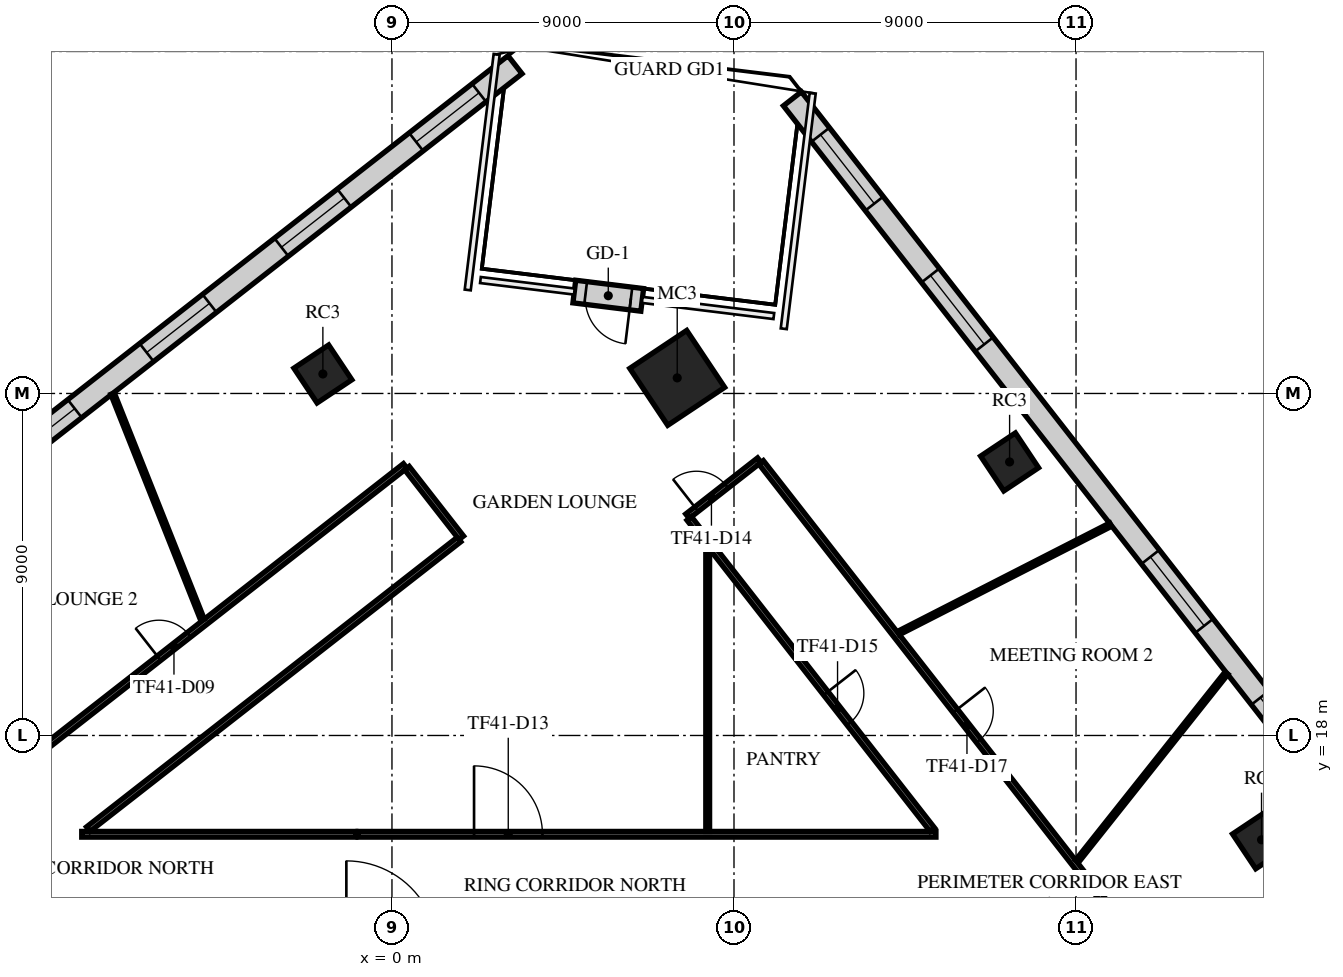
"""IFC4 building model, lengths in metres.
Left out: names, types, materials, properties, quantities, classifications, styles, units other than length and angle.
Written with IfcOpenShell. Run it as: python <this file> out.ifc"""

import sys

from ifc_helpers import new_model, si_unit, direction, frame, frame_2d, origin, origin_2d, place, context, subcontext, project, spatial, rectangle, extrude, element, fill, save


model = new_model("IFC4")
c1 = context("Model", 3, precision=1e-05, world=origin(), true_north=direction((0.0, 1.0)))
c2 = subcontext(c1, "Body", "Model", "MODEL_VIEW")
j1 = project(units=[si_unit("LENGTHUNIT", "METRE"), si_unit("PLANEANGLEUNIT", "RADIAN")], contexts=[c1])
p1 = place(None, origin())
s1 = spatial("IfcSite", under=j1, at=p1, CompositionType="ELEMENT")
p2 = place(p1, origin())
s2 = spatial("IfcBuilding", under=s1, at=p2, CompositionType="ELEMENT")
p3 = place(p2, frame((0.0, 0.0, 175.7)))
s3 = spatial("IfcBuildingStorey", under=s2, at=p3, CompositionType="ELEMENT", Elevation=175.7)
p4 = place(p3, frame((7.506, 27.41, 0.0), z_axis=(0.0, 0.0, 1.0), x_axis=(0.832028680356, 0.55473261583, 0.0)))
e1 = element("IfcColumn", 1, at=p4, inside=s3, PredefinedType="COLUMN", context=c2, shape_type="SweptSolid", body=[
    extrude(rectangle(XDim=1.8, YDim=1.8, at=origin_2d()), origin(), (0.0, 0.0, 1.0), 4.0),
])
for number, where, z_axis, x_axis in (
    (2, (-1.818, 27.513, 0.0), (0.0, 0.0, 1.0), (0.832, 0.555, 0.0)),
    (3, (22.881, 15.255, 0.0), (0.0, 0.0, 1.0), (0.832, 0.555, 0.0)),
    (4, (16.252, 25.198, 0.0), (0.0, 0.0, 1.0), (0.832, 0.555, 0.0)),
):
    element("IfcColumn", number, at=place(p3, frame(where, z_axis=z_axis, x_axis=x_axis)), inside=s3, PredefinedType="COLUMN", context=c2, shape_type="SweptSolid", body=[
        extrude(rectangle(XDim=1.1, YDim=1.1, at=origin_2d()), origin(), (0.0, 0.0, 1.0), 4.0),
    ])
p5 = place(p3, frame((3.238, 35.651, 0.0), z_axis=(0.0, 0.0, 1.0), x_axis=(-0.788009530914, -0.615663040298, 0.0)))
e5 = element("IfcWall", 5, at=p5, inside=s3, PredefinedType="STANDARD", context=c2, shape_type="SweptSolid", body=[
    extrude(rectangle(XDim=49.376, YDim=0.6, at=frame_2d((24.688, 0.0))), origin(), (0.0, 0.0, 1.0), 3.6),
])
p6 = place(p5, frame((1.2, 0.0, 0.9)))
e6 = element("IfcOpeningElement", 6, at=p6, cuts=e5, PredefinedType="OPENING", context=c2, shape_type="SweptSolid", body=[
    extrude(rectangle(XDim=2.1, YDim=2.1, at=frame_2d((1.05, 1.05))), frame((0.0, 0.31, 0.0), z_axis=(0.0, -1.0, 0.0), x_axis=(1.0, 0.0, 0.0)), (0.0, 0.0, 1.0), 0.62),
])
p7 = place(p5, frame((5.7, 0.0, 0.9)))
e7 = element("IfcOpeningElement", 7, at=p7, cuts=e5, PredefinedType="OPENING", context=c2, shape_type="SweptSolid", body=[
    extrude(rectangle(XDim=2.1, YDim=2.1, at=frame_2d((1.05, 1.05))), frame((0.0, 0.31, 0.0), z_axis=(0.0, -1.0, 0.0), x_axis=(1.0, 0.0, 0.0)), (0.0, 0.0, 1.0), 0.62),
])
p8 = place(p5, frame((10.2, 0.0, 0.9)))
e8 = element("IfcOpeningElement", 8, at=p8, cuts=e5, PredefinedType="OPENING", context=c2, shape_type="SweptSolid", body=[
    extrude(rectangle(XDim=2.1, YDim=2.1, at=frame_2d((1.05, 1.05))), frame((0.0, 0.31, 0.0), z_axis=(0.0, -1.0, 0.0), x_axis=(1.0, 0.0, 0.0)), (0.0, 0.0, 1.0), 0.62),
])
p9 = place(p5, frame((14.7, 0.0, 0.9)))
e9 = element("IfcOpeningElement", 9, at=p9, cuts=e5, PredefinedType="OPENING", context=c2, shape_type="SweptSolid", body=[
    extrude(rectangle(XDim=2.1, YDim=2.1, at=frame_2d((1.05, 1.05))), frame((0.0, 0.31, 0.0), z_axis=(0.0, -1.0, 0.0), x_axis=(1.0, 0.0, 0.0)), (0.0, 0.0, 1.0), 0.62),
])
p10 = place(p5, frame((19.2, 0.0, 0.9)))
e10 = element("IfcOpeningElement", 10, at=p10, cuts=e5, PredefinedType="OPENING", context=c2, shape_type="SweptSolid", body=[
    extrude(rectangle(XDim=2.1, YDim=2.1, at=frame_2d((1.05, 1.05))), frame((0.0, 0.31, 0.0), z_axis=(0.0, -1.0, 0.0), x_axis=(1.0, 0.0, 0.0)), (0.0, 0.0, 1.0), 0.62),
])
p11 = place(p5, frame((23.7, 0.0, 0.9)))
e11 = element("IfcOpeningElement", 11, at=p11, cuts=e5, PredefinedType="OPENING", context=c2, shape_type="SweptSolid", body=[
    extrude(rectangle(XDim=2.1, YDim=2.1, at=frame_2d((1.05, 1.05))), frame((0.0, 0.31, 0.0), z_axis=(0.0, -1.0, 0.0), x_axis=(1.0, 0.0, 0.0)), (0.0, 0.0, 1.0), 0.62),
])
p12 = place(p5, frame((28.2, 0.0, 0.9)))
e12 = element("IfcOpeningElement", 12, at=p12, cuts=e5, PredefinedType="OPENING", context=c2, shape_type="SweptSolid", body=[
    extrude(rectangle(XDim=2.1, YDim=2.1, at=frame_2d((1.05, 1.05))), frame((0.0, 0.31, 0.0), z_axis=(0.0, -1.0, 0.0), x_axis=(1.0, 0.0, 0.0)), (0.0, 0.0, 1.0), 0.62),
])
p13 = place(p5, frame((32.7, 0.0, 0.9)))
e13 = element("IfcOpeningElement", 13, at=p13, cuts=e5, PredefinedType="OPENING", context=c2, shape_type="SweptSolid", body=[
    extrude(rectangle(XDim=2.1, YDim=2.1, at=frame_2d((1.05, 1.05))), frame((0.0, 0.31, 0.0), z_axis=(0.0, -1.0, 0.0), x_axis=(1.0, 0.0, 0.0)), (0.0, 0.0, 1.0), 0.62),
])
p14 = place(p5, frame((37.2, 0.0, 0.9)))
e14 = element("IfcOpeningElement", 14, at=p14, cuts=e5, PredefinedType="OPENING", context=c2, shape_type="SweptSolid", body=[
    extrude(rectangle(XDim=2.1, YDim=2.1, at=frame_2d((1.05, 1.05))), frame((0.0, 0.31, 0.0), z_axis=(0.0, -1.0, 0.0), x_axis=(1.0, 0.0, 0.0)), (0.0, 0.0, 1.0), 0.62),
])
p15 = place(p5, frame((41.7, 0.0, 0.9)))
e15 = element("IfcOpeningElement", 15, at=p15, cuts=e5, PredefinedType="OPENING", context=c2, shape_type="SweptSolid", body=[
    extrude(rectangle(XDim=2.1, YDim=2.1, at=frame_2d((1.05, 1.05))), frame((0.0, 0.31, 0.0), z_axis=(0.0, -1.0, 0.0), x_axis=(1.0, 0.0, 0.0)), (0.0, 0.0, 1.0), 0.62),
])
p16 = place(p5, frame((46.138, 0.0, 0.9)))
e16 = element("IfcOpeningElement", 16, at=p16, cuts=e5, PredefinedType="OPENING", context=c2, shape_type="SweptSolid", body=[
    extrude(rectangle(XDim=2.1, YDim=2.1, at=frame_2d((1.05, 1.05))), frame((0.0, 0.31, 0.0), z_axis=(0.0, -1.0, 0.0), x_axis=(1.0, 0.0, 0.0)), (0.0, 0.0, 1.0), 0.62),
])
p17 = place(p3, frame((36.503, 1.52, 0.0), z_axis=(0.0, 0.0, 1.0), x_axis=(-0.615660779349, 0.788011297363, 0.0)))
e17 = element("IfcWall", 17, at=p17, inside=s3, PredefinedType="STANDARD", context=c2, shape_type="SweptSolid", body=[
    extrude(rectangle(XDim=42.176, YDim=0.6, at=frame_2d((21.088, 0.0))), origin(), (0.0, 0.0, 1.0), 3.6),
])
p18 = place(p17, frame((1.138, 0.0, 0.9)))
e18 = element("IfcOpeningElement", 18, at=p18, cuts=e17, PredefinedType="OPENING", context=c2, shape_type="SweptSolid", body=[
    extrude(rectangle(XDim=2.3, YDim=2.1, at=frame_2d((1.15, 1.05))), frame((0.0, 0.31, 0.0), z_axis=(0.0, -1.0, 0.0), x_axis=(1.0, 0.0, 0.0)), (0.0, 0.0, 1.0), 0.62),
])
p19 = place(p17, frame((5.776, 0.0, 0.9)))
e19 = element("IfcOpeningElement", 19, at=p19, cuts=e17, PredefinedType="OPENING", context=c2, shape_type="SweptSolid", body=[
    extrude(rectangle(XDim=2.3, YDim=2.1, at=frame_2d((1.15, 1.05))), frame((0.0, 0.31, 0.0), z_axis=(0.0, -1.0, 0.0), x_axis=(1.0, 0.0, 0.0)), (0.0, 0.0, 1.0), 0.62),
])
p20 = place(p17, frame((10.476, 0.0, 0.9)))
e20 = element("IfcOpeningElement", 20, at=p20, cuts=e17, PredefinedType="OPENING", context=c2, shape_type="SweptSolid", body=[
    extrude(rectangle(XDim=2.3, YDim=2.1, at=frame_2d((1.15, 1.05))), frame((0.0, 0.31, 0.0), z_axis=(0.0, -1.0, 0.0), x_axis=(1.0, 0.0, 0.0)), (0.0, 0.0, 1.0), 0.62),
])
p21 = place(p17, frame((15.176, 0.0, 0.9)))
e21 = element("IfcOpeningElement", 21, at=p21, cuts=e17, PredefinedType="OPENING", context=c2, shape_type="SweptSolid", body=[
    extrude(rectangle(XDim=2.3, YDim=2.1, at=frame_2d((1.15, 1.05))), frame((0.0, 0.31, 0.0), z_axis=(0.0, -1.0, 0.0), x_axis=(1.0, 0.0, 0.0)), (0.0, 0.0, 1.0), 0.62),
])
p22 = place(p17, frame((19.876, 0.0, 0.9)))
e22 = element("IfcOpeningElement", 22, at=p22, cuts=e17, PredefinedType="OPENING", context=c2, shape_type="SweptSolid", body=[
    extrude(rectangle(XDim=2.3, YDim=2.1, at=frame_2d((1.15, 1.05))), frame((0.0, 0.31, 0.0), z_axis=(0.0, -1.0, 0.0), x_axis=(1.0, 0.0, 0.0)), (0.0, 0.0, 1.0), 0.62),
])
p23 = place(p17, frame((24.576, 0.0, 0.9)))
e23 = element("IfcOpeningElement", 23, at=p23, cuts=e17, PredefinedType="OPENING", context=c2, shape_type="SweptSolid", body=[
    extrude(rectangle(XDim=2.3, YDim=2.1, at=frame_2d((1.15, 1.05))), frame((0.0, 0.31, 0.0), z_axis=(0.0, -1.0, 0.0), x_axis=(1.0, 0.0, 0.0)), (0.0, 0.0, 1.0), 0.62),
])
p24 = place(p17, frame((33.976, 0.0, 0.9)))
e24 = element("IfcOpeningElement", 24, at=p24, cuts=e17, PredefinedType="OPENING", context=c2, shape_type="SweptSolid", body=[
    extrude(rectangle(XDim=2.3, YDim=2.1, at=frame_2d((1.15, 1.05))), frame((0.0, 0.31, 0.0), z_axis=(0.0, -1.0, 0.0), x_axis=(1.0, 0.0, 0.0)), (0.0, 0.0, 1.0), 0.62),
])
p25 = place(p17, frame((38.676, 0.0, 0.9)))
e25 = element("IfcOpeningElement", 25, at=p25, cuts=e17, PredefinedType="OPENING", context=c2, shape_type="SweptSolid", body=[
    extrude(rectangle(XDim=2.3, YDim=2.1, at=frame_2d((1.15, 1.05))), frame((0.0, 0.31, 0.0), z_axis=(0.0, -1.0, 0.0), x_axis=(1.0, 0.0, 0.0)), (0.0, 0.0, 1.0), 0.62),
])
p26 = place(p3, frame((6.585, 29.462, 0.0), z_axis=(0.0, 0.0, 1.0), x_axis=(-0.992554965996, 0.121797534772, 0.0)))
e26 = element("IfcWall", 26, at=p26, inside=s3, PredefinedType="STANDARD", context=c2, shape_type="SweptSolid", body=[
    extrude(rectangle(XDim=1.8, YDim=0.6, at=frame_2d((0.9, 0.0))), origin(), (0.0, 0.0, 1.0), 3.6),
])
p27 = place(p26, frame((0.3, 0.0, 0.0)))
e27 = element("IfcOpeningElement", 27, at=p27, cuts=e26, PredefinedType="OPENING", context=c2, shape_type="SweptSolid", body=[
    extrude(rectangle(XDim=1.2, YDim=2.4, at=frame_2d((0.6, 1.2))), frame((0.0, 0.31, 0.0), z_axis=(0.0, -1.0, 0.0), x_axis=(1.0, 0.0, 0.0)), (0.0, 0.0, 1.0), 0.62),
])
p28 = place(p3, frame((-24.433, 5.734, 0.0), z_axis=(0.0, 0.0, 1.0), x_axis=(0.788010131951, 0.615662271008, 0.0)))
e28 = element("IfcWall", 28, at=p28, inside=s3, PredefinedType="PARTITIONING", context=c2, shape_type="SweptSolid", body=[
    extrude(rectangle(XDim=31.448, YDim=0.15, at=frame_2d((15.724, 0.0))), origin(), (0.0, 0.0, 1.0), 3.15),
])
p29 = place(p28, frame((13.108, 0.0, 0.0)))
e29 = element("IfcOpeningElement", 29, at=p29, cuts=e28, PredefinedType="OPENING", context=c2, shape_type="SweptSolid", body=[
    extrude(rectangle(XDim=1.0, YDim=2.1, at=frame_2d((0.5, 1.05))), frame((0.0, 0.085, 0.0), z_axis=(0.0, -1.0, 0.0), x_axis=(1.0, 0.0, 0.0)), (0.0, 0.0, 1.0), 0.17),
])
p30 = place(p28, frame((23.227, 0.0, 0.0)))
e30 = element("IfcOpeningElement", 30, at=p30, cuts=e28, PredefinedType="OPENING", context=c2, shape_type="SweptSolid", body=[
    extrude(rectangle(XDim=1.0, YDim=2.1, at=frame_2d((0.5, 1.05))), frame((0.0, 0.085, 0.0), z_axis=(0.0, -1.0, 0.0), x_axis=(1.0, 0.0, 0.0)), (0.0, 0.0, 1.0), 0.17),
])
p31 = place(p3, frame((-8.163, 15.4, 0.0), z_axis=(0.0, 0.0, 1.0), x_axis=(1.0, 0.0, 0.0)))
e31 = element("IfcWall", 31, at=p31, inside=s3, PredefinedType="PARTITIONING", context=c2, shape_type="SweptSolid", body=[
    extrude(rectangle(XDim=7.211, YDim=0.15, at=frame_2d((3.605, 0.0))), origin(), (0.0, 0.0, 1.0), 3.15),
])
p32 = place(p3, frame((-7.991, 15.534, 0.0), z_axis=(0.0, 0.0, 1.0), x_axis=(0.788030651404, 0.615636006459, 0.0)))
e32 = element("IfcWall", 32, at=p32, inside=s3, PredefinedType="PARTITIONING", context=c2, shape_type="SweptSolid", body=[
    extrude(rectangle(XDim=12.382, YDim=0.15, at=frame_2d((6.191, 0.0))), origin(), (0.0, 0.0, 1.0), 3.15),
])
p33 = place(p3, frame((-0.89, 15.4, 0.0), z_axis=(0.0, 0.0, 1.0), x_axis=(1.0, 0.0, 0.0)))
e33 = element("IfcWall", 33, at=p33, inside=s3, PredefinedType="PARTITIONING", context=c2, shape_type="SweptSolid", body=[
    extrude(rectangle(XDim=15.204, YDim=0.15, at=frame_2d((7.602, 0.0))), origin(), (0.0, 0.0, 1.0), 3.15),
])
p34 = place(p33, frame((3.05, 0.0, 0.0)))
e34 = element("IfcOpeningElement", 34, at=p34, cuts=e33, PredefinedType="OPENING", context=c2, shape_type="SweptSolid", body=[
    extrude(rectangle(XDim=1.8, YDim=2.1, at=frame_2d((0.9, 1.05))), frame((0.0, 0.085, 0.0), z_axis=(0.0, -1.0, 0.0), x_axis=(1.0, 0.0, 0.0)), (0.0, 0.0, 1.0), 0.17),
])
p35 = place(p3, frame((0.394, 25.036, 0.0), z_axis=(0.0, 0.0, 1.0), x_axis=(0.615277221136, -0.788310815067, 0.0)))
e35 = element("IfcWall", 35, at=p35, inside=s3, PredefinedType="PARTITIONING", context=c2, shape_type="SweptSolid", body=[
    extrude(rectangle(XDim=2.325, YDim=0.15, at=frame_2d((1.163, 0.0))), origin(), (0.0, 0.0, 1.0), 3.6),
])
p36 = place(p3, frame((7.776, 23.769, 0.0), z_axis=(0.0, 0.0, 1.0), x_axis=(0.788101492335, 0.615545317406, 0.0)))
e36 = element("IfcWall", 36, at=p36, inside=s3, PredefinedType="PARTITIONING", context=c2, shape_type="SweptSolid", body=[
    extrude(rectangle(XDim=2.4, YDim=0.15, at=frame_2d((1.2, 0.0))), origin(), (0.0, 0.0, 1.0), 3.15),
])
p37 = place(p36, frame((0.3, 0.0, 0.0)))
e37 = element("IfcOpeningElement", 37, at=p37, cuts=e36, PredefinedType="OPENING", context=c2, shape_type="SweptSolid", body=[
    extrude(rectangle(XDim=1.0, YDim=2.1, at=frame_2d((0.5, 1.05))), frame((0.0, 0.085, 0.0), z_axis=(0.0, -1.0, 0.0), x_axis=(1.0, 0.0, 0.0)), (0.0, 0.0, 1.0), 0.17),
])
p38 = place(p3, frame((7.822, 23.71, 0.0), z_axis=(0.0, 0.0, 1.0), x_axis=(0.615616229425, -0.788046101487, 0.0)))
e38 = element("IfcWall", 38, at=p38, inside=s3, PredefinedType="PARTITIONING", context=c2, shape_type="SweptSolid", body=[
    extrude(rectangle(XDim=10.391, YDim=0.15, at=frame_2d((5.196, 0.0))), origin(), (0.0, 0.0, 1.0), 3.15),
])
p39 = place(p38, frame((5.839, 0.0, 0.0)))
e39 = element("IfcOpeningElement", 39, at=p39, cuts=e38, PredefinedType="OPENING", context=c2, shape_type="SweptSolid", body=[
    extrude(rectangle(XDim=1.0, YDim=2.1, at=frame_2d((0.5, 1.05))), frame((0.0, 0.085, 0.0), z_axis=(0.0, -1.0, 0.0), x_axis=(1.0, 0.0, 0.0)), (0.0, 0.0, 1.0), 0.17),
])
p40 = place(p3, frame((9.713, 25.187, 0.0), z_axis=(0.0, 0.0, 1.0), x_axis=(0.615659714696, -0.788012129158, 0.0)))
e40 = element("IfcWall", 40, at=p40, inside=s3, PredefinedType="PARTITIONING", context=c2, shape_type="SweptSolid", body=[
    extrude(rectangle(XDim=27.811, YDim=0.15, at=frame_2d((13.905, 0.0))), origin(), (0.0, 0.0, 1.0), 3.15),
])
p41 = place(p40, frame((8.299, 0.0, 0.0)))
e41 = element("IfcOpeningElement", 41, at=p41, cuts=e40, PredefinedType="OPENING", context=c2, shape_type="SweptSolid", body=[
    extrude(rectangle(XDim=1.0, YDim=2.1, at=frame_2d((0.5, 1.05))), frame((0.0, 0.085, 0.0), z_axis=(0.0, -1.0, 0.0), x_axis=(1.0, 0.0, 0.0)), (0.0, 0.0, 1.0), 0.17),
])
p42 = place(p40, frame((15.951, 0.0, 0.0)))
e42 = element("IfcOpeningElement", 42, at=p42, cuts=e40, PredefinedType="OPENING", context=c2, shape_type="SweptSolid", body=[
    extrude(rectangle(XDim=1.0, YDim=2.1, at=frame_2d((0.5, 1.05))), frame((0.0, 0.085, 0.0), z_axis=(0.0, -1.0, 0.0), x_axis=(1.0, 0.0, 0.0)), (0.0, 0.0, 1.0), 0.17),
])
p43 = place(p3, frame((-7.351, 26.995, 0.0), z_axis=(0.0, 0.0, 1.0), x_axis=(0.369457986925, -0.929247435239, 0.0)))
e43 = element("IfcWall", 43, at=p43, inside=s3, PredefinedType="PARTITIONING", context=c2, shape_type="SweptSolid", body=[
    extrude(rectangle(XDim=6.406, YDim=0.1, at=frame_2d((3.203, 0.0))), origin(), (0.0, 0.0, 1.0), 2.9),
])
p44 = place(p3, frame((8.308, 15.475, 0.0), z_axis=(0.0, 0.0, 1.0), x_axis=(0.0, 1.0, 0.0)))
e44 = element("IfcWall", 44, at=p44, inside=s3, PredefinedType="PARTITIONING", context=c2, shape_type="SweptSolid", body=[
    extrude(rectangle(XDim=7.427, YDim=0.1, at=frame_2d((3.713, 0.0))), origin(), (0.0, 0.0, 1.0), 3.6),
])
p45 = place(p3, frame((13.33, 20.696, 0.0), z_axis=(0.0, 0.0, 1.0), x_axis=(0.890489061699, 0.455004649421, 0.0)))
e45 = element("IfcWall", 45, at=p45, inside=s3, PredefinedType="PARTITIONING", context=c2, shape_type="SweptSolid", body=[
    extrude(rectangle(XDim=6.266, YDim=0.1, at=frame_2d((3.133, 0.0))), origin(), (0.0, 0.0, 1.0), 2.9),
])
p46 = place(p3, frame((18.025, 14.689, 0.0), z_axis=(0.0, 0.0, 1.0), x_axis=(0.622051275171, 0.782976507348, 0.0)))
e46 = element("IfcWall", 46, at=p46, inside=s3, PredefinedType="PARTITIONING", context=c2, shape_type="SweptSolid", body=[
    extrude(rectangle(XDim=6.326, YDim=0.1, at=frame_2d((3.163, 0.0))), origin(), (0.0, 0.0, 1.0), 2.9),
])
p47 = place(p6, origin())
e47 = element("IfcWindow", 47, at=p47, inside=s3, PartitioningType="SINGLE_PANEL", PredefinedType="WINDOW", context=c2, shape_type="SweptSolid", body=[
    extrude(rectangle(XDim=2.1, YDim=2.1, at=frame_2d((1.05, 1.05))), frame((0.0, 0.03, 0.0), z_axis=(0.0, -1.0, 0.0), x_axis=(1.0, 0.0, 0.0)), (0.0, 0.0, 1.0), 0.06),
])
fill(e6, e47)
p48 = place(p7, origin())
e48 = element("IfcWindow", 48, at=p48, inside=s3, PartitioningType="SINGLE_PANEL", PredefinedType="WINDOW", context=c2, shape_type="SweptSolid", body=[
    extrude(rectangle(XDim=2.1, YDim=2.1, at=frame_2d((1.05, 1.05))), frame((0.0, 0.03, 0.0), z_axis=(0.0, -1.0, 0.0), x_axis=(1.0, 0.0, 0.0)), (0.0, 0.0, 1.0), 0.06),
])
fill(e7, e48)
p49 = place(p8, origin())
e49 = element("IfcWindow", 49, at=p49, inside=s3, PartitioningType="SINGLE_PANEL", PredefinedType="WINDOW", context=c2, shape_type="SweptSolid", body=[
    extrude(rectangle(XDim=2.1, YDim=2.1, at=frame_2d((1.05, 1.05))), frame((0.0, 0.03, 0.0), z_axis=(0.0, -1.0, 0.0), x_axis=(1.0, 0.0, 0.0)), (0.0, 0.0, 1.0), 0.06),
])
fill(e8, e49)
p50 = place(p9, origin())
e50 = element("IfcWindow", 50, at=p50, inside=s3, PartitioningType="SINGLE_PANEL", PredefinedType="WINDOW", context=c2, shape_type="SweptSolid", body=[
    extrude(rectangle(XDim=2.1, YDim=2.1, at=frame_2d((1.05, 1.05))), frame((0.0, 0.03, 0.0), z_axis=(0.0, -1.0, 0.0), x_axis=(1.0, 0.0, 0.0)), (0.0, 0.0, 1.0), 0.06),
])
fill(e9, e50)
p51 = place(p22, origin())
e51 = element("IfcWindow", 51, at=p51, inside=s3, PartitioningType="SINGLE_PANEL", PredefinedType="WINDOW", context=c2, shape_type="SweptSolid", body=[
    extrude(rectangle(XDim=2.3, YDim=2.1, at=frame_2d((1.15, 1.05))), frame((0.0, 0.03, 0.0), z_axis=(0.0, -1.0, 0.0), x_axis=(1.0, 0.0, 0.0)), (0.0, 0.0, 1.0), 0.06),
])
fill(e22, e51)
p52 = place(p23, origin())
e52 = element("IfcWindow", 52, at=p52, inside=s3, PartitioningType="SINGLE_PANEL", PredefinedType="WINDOW", context=c2, shape_type="SweptSolid", body=[
    extrude(rectangle(XDim=2.3, YDim=2.1, at=frame_2d((1.15, 1.05))), frame((0.0, 0.03, 0.0), z_axis=(0.0, -1.0, 0.0), x_axis=(1.0, 0.0, 0.0)), (0.0, 0.0, 1.0), 0.06),
])
fill(e23, e52)
p53 = place(p24, origin())
e53 = element("IfcWindow", 53, at=p53, inside=s3, PartitioningType="SINGLE_PANEL", PredefinedType="WINDOW", context=c2, shape_type="SweptSolid", body=[
    extrude(rectangle(XDim=2.3, YDim=2.1, at=frame_2d((1.15, 1.05))), frame((0.0, 0.03, 0.0), z_axis=(0.0, -1.0, 0.0), x_axis=(1.0, 0.0, 0.0)), (0.0, 0.0, 1.0), 0.06),
])
fill(e24, e53)
p54 = place(p25, origin())
e54 = element("IfcWindow", 54, at=p54, inside=s3, PartitioningType="SINGLE_PANEL", PredefinedType="WINDOW", context=c2, shape_type="SweptSolid", body=[
    extrude(rectangle(XDim=2.3, YDim=2.1, at=frame_2d((1.15, 1.05))), frame((0.0, 0.03, 0.0), z_axis=(0.0, -1.0, 0.0), x_axis=(1.0, 0.0, 0.0)), (0.0, 0.0, 1.0), 0.06),
])
fill(e25, e54)
p55 = place(p27, origin())
e55 = element("IfcDoor", 55, at=p55, inside=s3, OperationType="SINGLE_SWING_LEFT", PredefinedType="DOOR", context=c2, shape_type="SweptSolid", body=[
    extrude(rectangle(XDim=1.2, YDim=2.4, at=frame_2d((0.6, 1.2))), frame((0.0, 0.025, 0.0), z_axis=(0.0, -1.0, 0.0), x_axis=(1.0, 0.0, 0.0)), (0.0, 0.0, 1.0), 0.05),
])
fill(e27, e55)
p56 = place(p30, origin())
e56 = element("IfcDoor", 56, at=p56, inside=s3, OperationType="SINGLE_SWING_RIGHT", PredefinedType="DOOR", context=c2, shape_type="SweptSolid", body=[
    extrude(rectangle(XDim=1.0, YDim=2.1, at=frame_2d((0.5, 1.05))), frame((0.0, 0.025, 0.0), z_axis=(0.0, -1.0, 0.0), x_axis=(1.0, 0.0, 0.0)), (0.0, 0.0, 1.0), 0.05),
])
fill(e30, e56)
p57 = place(p34, origin())
e57 = element("IfcDoor", 57, at=p57, inside=s3, OperationType="DOUBLE_DOOR_SINGLE_SWING", PredefinedType="DOOR", context=c2, shape_type="SweptSolid", body=[
    extrude(rectangle(XDim=1.8, YDim=2.1, at=frame_2d((0.9, 1.05))), frame((0.0, 0.025, 0.0), z_axis=(0.0, -1.0, 0.0), x_axis=(1.0, 0.0, 0.0)), (0.0, 0.0, 1.0), 0.05),
])
fill(e34, e57)
p58 = place(p37, origin())
e58 = element("IfcDoor", 58, at=p58, inside=s3, OperationType="SINGLE_SWING_LEFT", PredefinedType="DOOR", context=c2, shape_type="SweptSolid", body=[
    extrude(rectangle(XDim=1.0, YDim=2.1, at=frame_2d((0.5, 1.05))), frame((0.0, 0.025, 0.0), z_axis=(0.0, -1.0, 0.0), x_axis=(1.0, 0.0, 0.0)), (0.0, 0.0, 1.0), 0.05),
])
fill(e37, e58)
p59 = place(p39, frame((1.0, 0.0, 0.0), z_axis=(0.0, 0.0, 1.0), x_axis=(-1.0, 0.0, 0.0)))
e59 = element("IfcDoor", 59, at=p59, inside=s3, OperationType="SINGLE_SWING_LEFT", PredefinedType="DOOR", context=c2, shape_type="SweptSolid", body=[
    extrude(rectangle(XDim=1.0, YDim=2.1, at=frame_2d((0.5, 1.05))), frame((0.0, 0.025, 0.0), z_axis=(0.0, -1.0, 0.0), x_axis=(1.0, 0.0, 0.0)), (0.0, 0.0, 1.0), 0.05),
])
fill(e39, e59)
p60 = place(p41, origin())
e60 = element("IfcDoor", 60, at=p60, inside=s3, OperationType="SINGLE_SWING_RIGHT", PredefinedType="DOOR", context=c2, shape_type="SweptSolid", body=[
    extrude(rectangle(XDim=1.0, YDim=2.1, at=frame_2d((0.5, 1.05))), frame((0.0, 0.025, 0.0), z_axis=(0.0, -1.0, 0.0), x_axis=(1.0, 0.0, 0.0)), (0.0, 0.0, 1.0), 0.05),
])
fill(e41, e60)
save(model, sys.argv[1])
